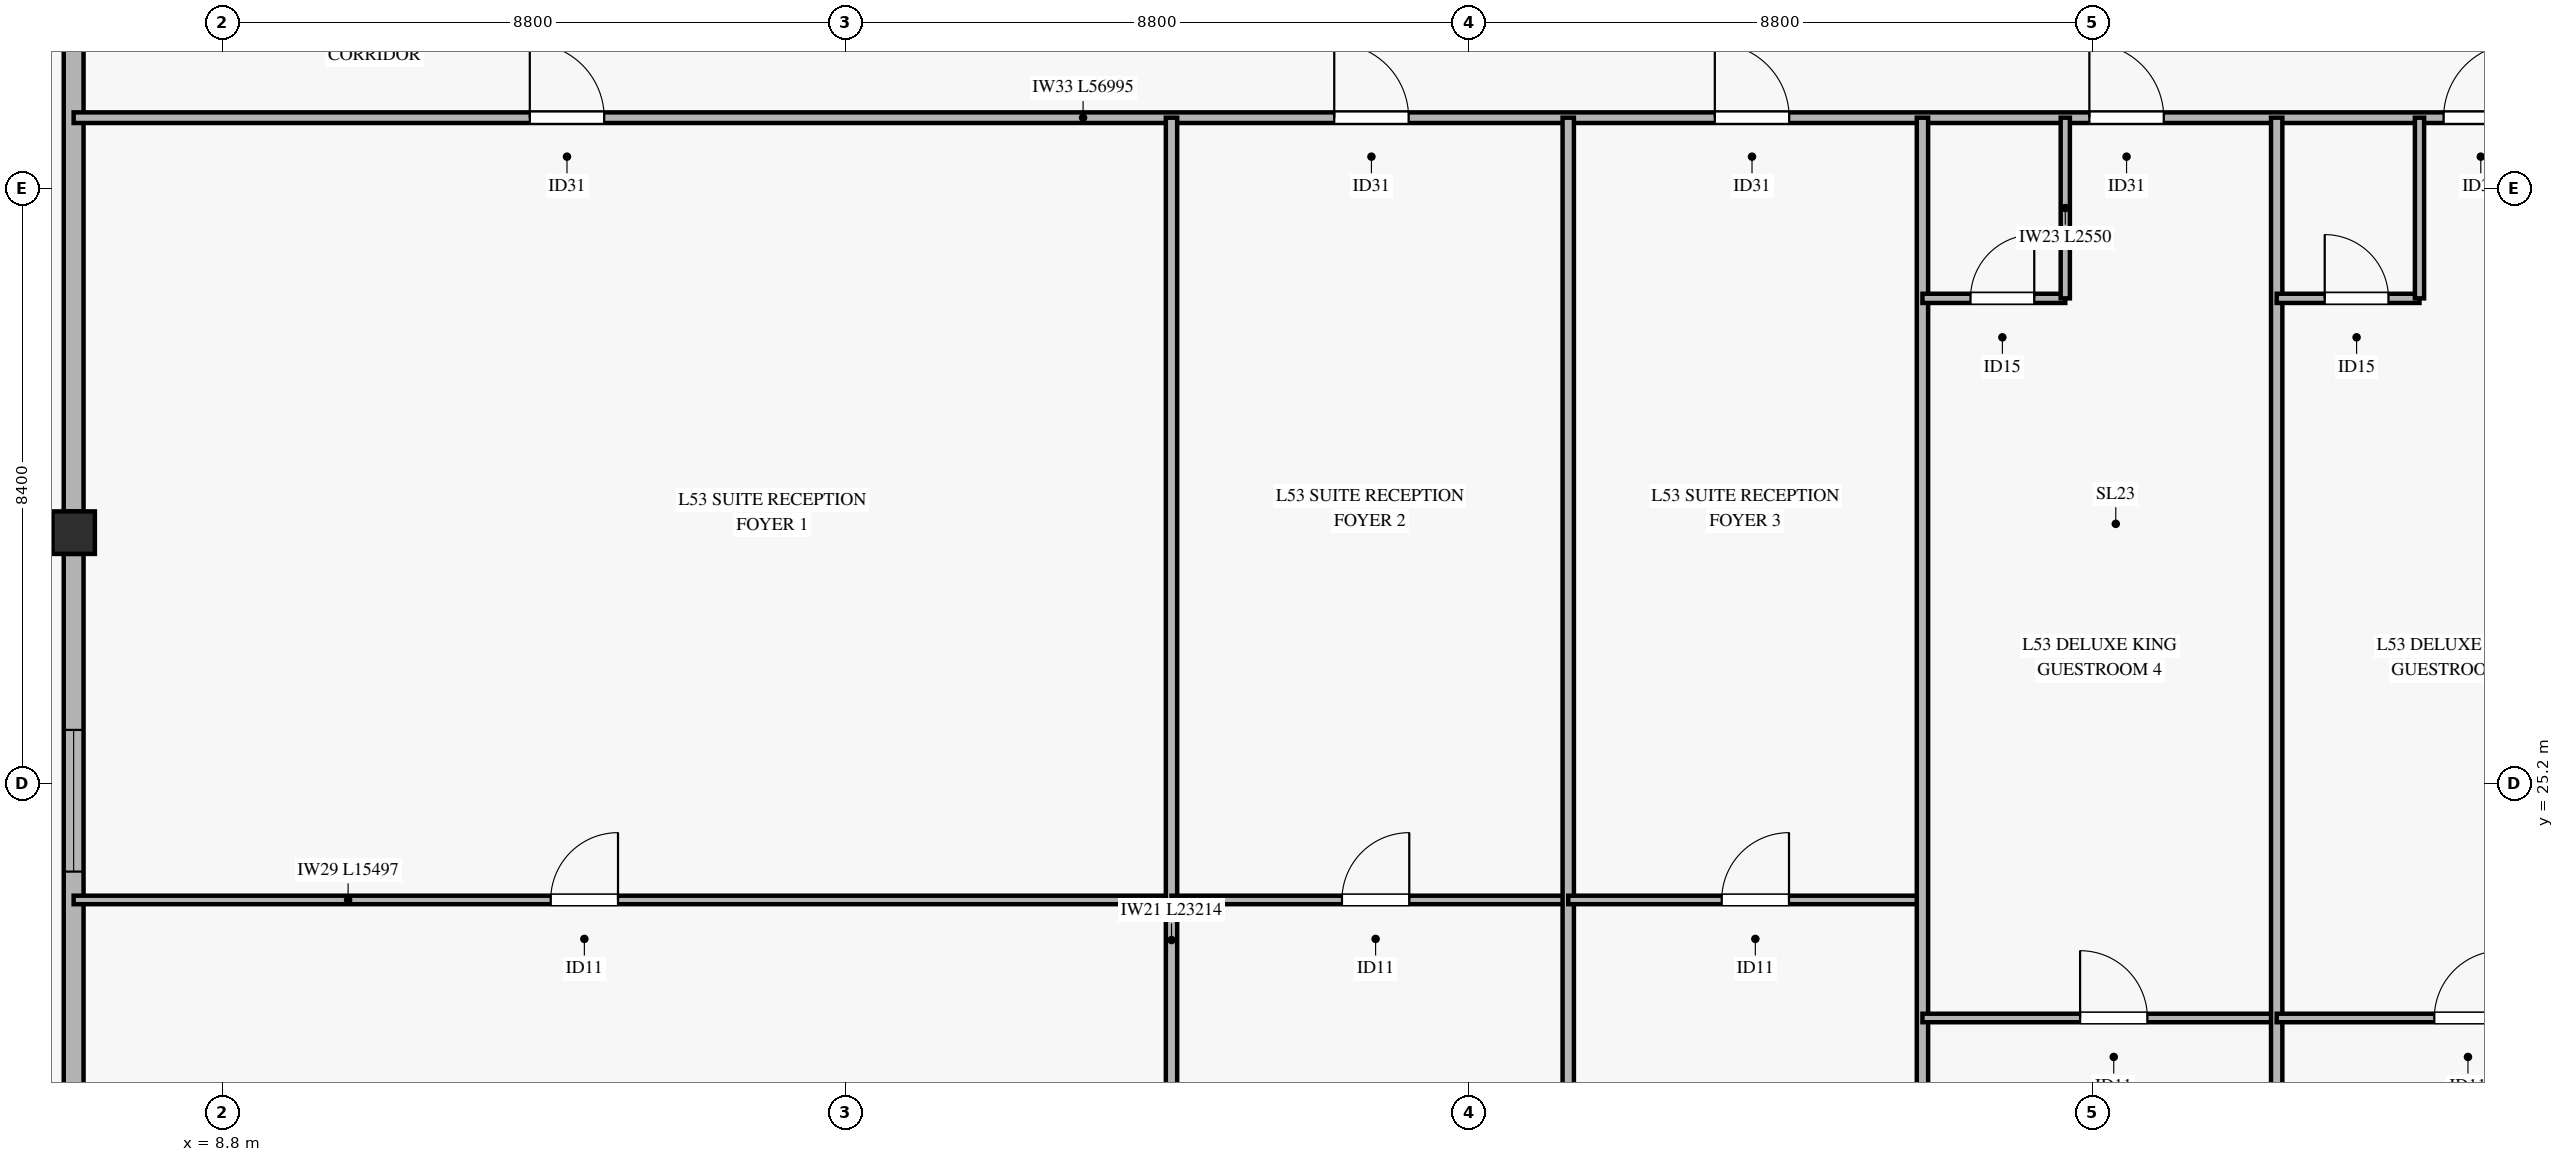
"""IFC4 building model, lengths in metres.
Left out: names, types, materials, properties, quantities, classifications, styles, units other than length and angle.
Written with IfcOpenShell. Run it as: python <this file> out.ifc"""

import sys

from ifc_helpers import new_model, si_unit, direction, frame, frame_2d, origin, origin_2d, place, context, subcontext, project, spatial, rectangle, hollow_rectangle, extrude, source, transform, mapped, element, fill, save


model = new_model("IFC4")
c1 = context("Model", 3, precision=1e-05, world=origin(), true_north=direction((0.0, 1.0)))
c2 = subcontext(c1, "Body", "Model", "MODEL_VIEW")
j1 = project(units=[si_unit("LENGTHUNIT", "METRE"), si_unit("PLANEANGLEUNIT", "RADIAN")], contexts=[c1])
p1 = place(None, origin())
s1 = spatial("IfcSite", under=j1, at=p1, CompositionType="ELEMENT")
p2 = place(p1, origin())
s2 = spatial("IfcBuilding", under=s1, at=p2, CompositionType="ELEMENT")
p3 = place(p2, frame((0.0, 0.0, 209.7)))
s3 = spatial("IfcBuildingStorey", under=s2, at=p3, CompositionType="ELEMENT", Elevation=209.7)
m1 = source(origin(), c2, "Body", "SweptSolid", [
    extrude(hollow_rectangle(XDim=0.6, YDim=0.6, WallThickness=0.028, at=origin_2d()), origin(), (0.0, 0.0, 1.0), 3.329),
])
p4 = place(p3, frame((6.703, 28.743, 0.0), z_axis=(0.124672330917, 0.139999693953, 0.982271294295), x_axis=(-0.746804669772, 0.665043446104, 0.0)))
e1 = element("IfcColumn", 1, at=p4, inside=s3, PredefinedType="COLUMN", context=c2, shape_type="MappedRepresentation", body=[
    mapped(m1, transform((0.0, 0.0, 0.0), x_axis=(1.0, 0.0, 0.0), y_axis=(0.0, 1.0, 0.0), z_axis=(0.0, 0.0, 1.0), scale=1.0)),
])
p5 = place(p3, frame((6.703, 14.186, 0.0), z_axis=(0.0, 0.0, 1.0), x_axis=(0.0, 1.0, 0.0)))
e2 = element("IfcWall", 2, at=p5, inside=s3, PredefinedType="SOLIDWALL", context=c2, shape_type="SweptSolid", body=[
    extrude(rectangle(XDim=14.257, YDim=0.28, at=frame_2d((7.128, 0.0))), origin(), (0.0, 0.0, 1.0), 2.75),
])
p6 = place(p5, frame((2.947, 0.0, 0.45)))
e3 = element("IfcOpeningElement", 3, at=p6, cuts=e2, PredefinedType="OPENING", context=c2, shape_type="SweptSolid", body=[
    extrude(rectangle(XDim=2.0, YDim=2.0, at=frame_2d((1.0, 1.0))), frame((0.0, 0.15, 0.0), z_axis=(0.0, -1.0, 0.0), x_axis=(1.0, 0.0, 0.0)), (0.0, 0.0, 1.0), 0.3),
])
p7 = place(p5, frame((9.773, 0.0, 0.45)))
e4 = element("IfcOpeningElement", 4, at=p7, cuts=e2, PredefinedType="OPENING", context=c2, shape_type="SweptSolid", body=[
    extrude(rectangle(XDim=2.0, YDim=2.0, at=frame_2d((1.0, 1.0))), frame((0.0, 0.15, 0.0), z_axis=(0.0, -1.0, 0.0), x_axis=(1.0, 0.0, 0.0)), (0.0, 0.0, 1.0), 0.3),
])
p8 = place(p3, frame((6.703, 29.043, 0.0), z_axis=(0.0, 0.0, 1.0), x_axis=(0.0, 1.0, 0.0)))
e5 = element("IfcWall", 5, at=p8, inside=s3, PredefinedType="SOLIDWALL", context=c2, shape_type="SweptSolid", body=[
    extrude(rectangle(XDim=14.257, YDim=0.28, at=frame_2d((7.128, 0.0))), origin(), (0.0, 0.0, 1.0), 2.75),
])
p9 = place(p8, frame((8.812, 0.0, 0.45)))
e6 = element("IfcOpeningElement", 6, at=p9, cuts=e5, PredefinedType="OPENING", context=c2, shape_type="SweptSolid", body=[
    extrude(rectangle(XDim=2.0, YDim=2.0, at=frame_2d((1.0, 1.0))), frame((0.0, 0.15, 0.0), z_axis=(0.0, -1.0, 0.0), x_axis=(1.0, 0.0, 0.0)), (0.0, 0.0, 1.0), 0.3),
])
p10 = place(p3, frame((6.703, 34.6, 0.0), z_axis=(0.0, 0.0, 1.0), x_axis=(1.0, 0.0, 0.0)))
e7 = element("IfcWall", 7, at=p10, inside=s3, PredefinedType="PARTITIONING", context=c2, shape_type="SweptSolid", body=[
    extrude(rectangle(XDim=56.995, YDim=0.15, at=frame_2d((28.498, 0.0))), origin(), (0.0, 0.0, 1.0), 2.455),
])
p11 = place(p10, frame((6.439, 0.0, 0.0)))
e8 = element("IfcOpeningElement", 8, at=p11, cuts=e7, PredefinedType="OPENING", context=c2, shape_type="SweptSolid", body=[
    extrude(rectangle(XDim=1.05, YDim=2.15, at=frame_2d((0.525, 1.075))), frame((0.0, 0.085, 0.0), z_axis=(0.0, -1.0, 0.0), x_axis=(1.0, 0.0, 0.0)), (0.0, 0.0, 1.0), 0.17),
])
p12 = place(p10, frame((17.794, 0.0, 0.0)))
e9 = element("IfcOpeningElement", 9, at=p12, cuts=e7, PredefinedType="OPENING", context=c2, shape_type="SweptSolid", body=[
    extrude(rectangle(XDim=1.05, YDim=2.15, at=frame_2d((0.525, 1.075))), frame((0.0, 0.085, 0.0), z_axis=(0.0, -1.0, 0.0), x_axis=(1.0, 0.0, 0.0)), (0.0, 0.0, 1.0), 0.17),
])
p13 = place(p10, frame((23.166, 0.0, 0.0)))
e10 = element("IfcOpeningElement", 10, at=p13, cuts=e7, PredefinedType="OPENING", context=c2, shape_type="SweptSolid", body=[
    extrude(rectangle(XDim=1.05, YDim=2.15, at=frame_2d((0.525, 1.075))), frame((0.0, 0.085, 0.0), z_axis=(0.0, -1.0, 0.0), x_axis=(1.0, 0.0, 0.0)), (0.0, 0.0, 1.0), 0.17),
])
p14 = place(p10, frame((28.453, 0.0, 0.0)))
e11 = element("IfcOpeningElement", 11, at=p14, cuts=e7, PredefinedType="OPENING", context=c2, shape_type="SweptSolid", body=[
    extrude(rectangle(XDim=1.05, YDim=2.15, at=frame_2d((0.525, 1.075))), frame((0.0, 0.085, 0.0), z_axis=(0.0, -1.0, 0.0), x_axis=(1.0, 0.0, 0.0)), (0.0, 0.0, 1.0), 0.17),
])
p15 = place(p10, frame((33.453, 0.0, 0.0)))
e12 = element("IfcOpeningElement", 12, at=p15, cuts=e7, PredefinedType="OPENING", context=c2, shape_type="SweptSolid", body=[
    extrude(rectangle(XDim=1.05, YDim=2.15, at=frame_2d((0.525, 1.075))), frame((0.0, 0.085, 0.0), z_axis=(0.0, -1.0, 0.0), x_axis=(1.0, 0.0, 0.0)), (0.0, 0.0, 1.0), 0.17),
])
p16 = place(p10, frame((43.973, 0.0, 0.0)))
e13 = element("IfcOpeningElement", 13, at=p16, cuts=e7, PredefinedType="OPENING", context=c2, shape_type="SweptSolid", body=[
    extrude(rectangle(XDim=1.05, YDim=2.15, at=frame_2d((0.525, 1.075))), frame((0.0, 0.085, 0.0), z_axis=(0.0, -1.0, 0.0), x_axis=(1.0, 0.0, 0.0)), (0.0, 0.0, 1.0), 0.17),
])
p17 = place(p3, frame((6.703, 23.559, 0.0), z_axis=(0.0, 0.0, 1.0), x_axis=(1.0, 0.0, 0.0)))
e14 = element("IfcWall", 14, at=p17, inside=s3, PredefinedType="PARTITIONING", context=c2, shape_type="SweptSolid", body=[
    extrude(rectangle(XDim=15.497, YDim=0.12, at=frame_2d((7.749, 0.0))), origin(), (0.0, 0.0, 1.0), 2.455),
])
p18 = place(p17, frame((6.734, 0.0, 0.0)))
e15 = element("IfcOpeningElement", 15, at=p18, cuts=e14, PredefinedType="OPENING", context=c2, shape_type="SweptSolid", body=[
    extrude(rectangle(XDim=0.95, YDim=2.1, at=frame_2d((0.475, 1.05))), frame((0.0, 0.07, 0.0), z_axis=(0.0, -1.0, 0.0), x_axis=(1.0, 0.0, 0.0)), (0.0, 0.0, 1.0), 0.14),
])
p19 = place(p3, frame((22.2, 11.386, 0.0), z_axis=(0.0, 0.0, 1.0), x_axis=(0.0, 1.0, 0.0)))
e16 = element("IfcWall", 16, at=p19, inside=s3, PredefinedType="PARTITIONING", context=c2, shape_type="SweptSolid", body=[
    extrude(rectangle(XDim=23.214, YDim=0.16, at=frame_2d((11.607, 0.0))), origin(), (0.0, 0.0, 1.0), 2.755),
])
p20 = place(p3, frame((22.2, 23.559, 0.0), z_axis=(0.0, 0.0, 1.0), x_axis=(1.0, 0.0, 0.0)))
e17 = element("IfcWall", 17, at=p20, inside=s3, PredefinedType="PARTITIONING", context=c2, shape_type="SweptSolid", body=[
    extrude(rectangle(XDim=5.6, YDim=0.12, at=frame_2d((2.8, 0.0))), origin(), (0.0, 0.0, 1.0), 3.27),
])
p21 = place(p20, frame((2.406, 0.0, 0.0)))
e18 = element("IfcOpeningElement", 18, at=p21, cuts=e17, PredefinedType="OPENING", context=c2, shape_type="SweptSolid", body=[
    extrude(rectangle(XDim=0.95, YDim=2.1, at=frame_2d((0.475, 1.05))), frame((0.0, 0.07, 0.0), z_axis=(0.0, -1.0, 0.0), x_axis=(1.0, 0.0, 0.0)), (0.0, 0.0, 1.0), 0.14),
])
p22 = place(p3, frame((27.8, 11.386, 0.0), z_axis=(0.0, 0.0, 1.0), x_axis=(0.0, 1.0, 0.0)))
e19 = element("IfcWall", 19, at=p22, inside=s3, PredefinedType="PARTITIONING", context=c2, shape_type="SweptSolid", body=[
    extrude(rectangle(XDim=23.214, YDim=0.16, at=frame_2d((11.607, 0.0))), origin(), (0.0, 0.0, 1.0), 2.755),
])
p23 = place(p3, frame((27.8, 23.559, 0.0), z_axis=(0.0, 0.0, 1.0), x_axis=(1.0, 0.0, 0.0)))
e20 = element("IfcWall", 20, at=p23, inside=s3, PredefinedType="PARTITIONING", context=c2, shape_type="SweptSolid", body=[
    extrude(rectangle(XDim=5.0, YDim=0.12, at=frame_2d((2.5, 0.0))), origin(), (0.0, 0.0, 1.0), 2.455),
])
p24 = place(p23, frame((2.166, 0.0, 0.0)))
e21 = element("IfcOpeningElement", 21, at=p24, cuts=e20, PredefinedType="OPENING", context=c2, shape_type="SweptSolid", body=[
    extrude(rectangle(XDim=0.95, YDim=2.1, at=frame_2d((0.475, 1.05))), frame((0.0, 0.07, 0.0), z_axis=(0.0, -1.0, 0.0), x_axis=(1.0, 0.0, 0.0)), (0.0, 0.0, 1.0), 0.14),
])
p25 = place(p3, frame((32.8, 11.386, 0.0), z_axis=(0.0, 0.0, 1.0), x_axis=(0.0, 1.0, 0.0)))
e22 = element("IfcWall", 22, at=p25, inside=s3, PredefinedType="PARTITIONING", context=c2, shape_type="SweptSolid", body=[
    extrude(rectangle(XDim=23.214, YDim=0.16, at=frame_2d((11.607, 0.0))), origin(), (0.0, 0.0, 1.0), 2.755),
])
p26 = place(p3, frame((32.8, 32.05, 0.0), z_axis=(0.0, 0.0, 1.0), x_axis=(1.0, 0.0, 0.0)))
e23 = element("IfcWall", 23, at=p26, inside=s3, PredefinedType="PARTITIONING", context=c2, shape_type="SweptSolid", body=[
    extrude(rectangle(XDim=2.016, YDim=0.13, at=frame_2d((1.008, 0.0))), origin(), (0.0, 0.0, 1.0), 3.27),
])
p27 = place(p26, frame((0.678, 0.0, 0.0)))
e24 = element("IfcOpeningElement", 24, at=p27, cuts=e23, PredefinedType="OPENING", context=c2, shape_type="SweptSolid", body=[
    extrude(rectangle(XDim=0.9, YDim=2.1, at=frame_2d((0.45, 1.05))), frame((0.0, 0.075, 0.0), z_axis=(0.0, -1.0, 0.0), x_axis=(1.0, 0.0, 0.0)), (0.0, 0.0, 1.0), 0.15),
])
p28 = place(p3, frame((34.816, 32.05, 0.0), z_axis=(0.0, 0.0, 1.0), x_axis=(0.0, 1.0, 0.0)))
e25 = element("IfcWall", 25, at=p28, inside=s3, PredefinedType="PARTITIONING", context=c2, shape_type="SweptSolid", body=[
    extrude(rectangle(XDim=2.55, YDim=0.13, at=frame_2d((1.275, 0.0))), origin(), (0.0, 0.0, 1.0), 2.855),
])
p29 = place(p3, frame((32.8, 21.893, 0.0), z_axis=(0.0, 0.0, 1.0), x_axis=(1.0, 0.0, 0.0)))
e26 = element("IfcWall", 26, at=p29, inside=s3, PredefinedType="PARTITIONING", context=c2, shape_type="SweptSolid", body=[
    extrude(rectangle(XDim=5.0, YDim=0.12, at=frame_2d((2.5, 0.0))), origin(), (0.0, 0.0, 1.0), 2.455),
])
p30 = place(p29, frame((2.225, 0.0, 0.0)))
e27 = element("IfcOpeningElement", 27, at=p30, cuts=e26, PredefinedType="OPENING", context=c2, shape_type="SweptSolid", body=[
    extrude(rectangle(XDim=0.95, YDim=2.1, at=frame_2d((0.475, 1.05))), frame((0.0, 0.07, 0.0), z_axis=(0.0, -1.0, 0.0), x_axis=(1.0, 0.0, 0.0)), (0.0, 0.0, 1.0), 0.14),
])
p31 = place(p3, frame((37.8, 11.386, 0.0), z_axis=(0.0, 0.0, 1.0), x_axis=(0.0, 1.0, 0.0)))
e28 = element("IfcWall", 28, at=p31, inside=s3, PredefinedType="PARTITIONING", context=c2, shape_type="SweptSolid", body=[
    extrude(rectangle(XDim=23.214, YDim=0.16, at=frame_2d((11.607, 0.0))), origin(), (0.0, 0.0, 1.0), 2.455),
])
p32 = place(p3, frame((37.8, 32.05, 0.0), z_axis=(0.0, 0.0, 1.0), x_axis=(1.0, 0.0, 0.0)))
e29 = element("IfcWall", 29, at=p32, inside=s3, PredefinedType="PARTITIONING", context=c2, shape_type="SweptSolid", body=[
    extrude(rectangle(XDim=2.016, YDim=0.13, at=frame_2d((1.008, 0.0))), origin(), (0.0, 0.0, 1.0), 3.27),
])
p33 = place(p32, frame((0.678, 0.0, 0.0)))
e30 = element("IfcOpeningElement", 30, at=p33, cuts=e29, PredefinedType="OPENING", context=c2, shape_type="SweptSolid", body=[
    extrude(rectangle(XDim=0.9, YDim=2.1, at=frame_2d((0.45, 1.05))), frame((0.0, 0.075, 0.0), z_axis=(0.0, -1.0, 0.0), x_axis=(1.0, 0.0, 0.0)), (0.0, 0.0, 1.0), 0.15),
])
p34 = place(p3, frame((39.816, 32.05, 0.0), z_axis=(0.0, 0.0, 1.0), x_axis=(0.0, 1.0, 0.0)))
e31 = element("IfcWall", 31, at=p34, inside=s3, PredefinedType="PARTITIONING", context=c2, shape_type="SweptSolid", body=[
    extrude(rectangle(XDim=2.55, YDim=0.13, at=frame_2d((1.275, 0.0))), origin(), (0.0, 0.0, 1.0), 2.855),
])
p35 = place(p3, frame((37.8, 21.893, 0.0), z_axis=(0.0, 0.0, 1.0), x_axis=(1.0, 0.0, 0.0)))
e32 = element("IfcWall", 32, at=p35, inside=s3, PredefinedType="PARTITIONING", context=c2, shape_type="SweptSolid", body=[
    extrude(rectangle(XDim=5.0, YDim=0.12, at=frame_2d((2.5, 0.0))), origin(), (0.0, 0.0, 1.0), 3.27),
])
p36 = place(p35, frame((2.225, 0.0, 0.0)))
e33 = element("IfcOpeningElement", 33, at=p36, cuts=e32, PredefinedType="OPENING", context=c2, shape_type="SweptSolid", body=[
    extrude(rectangle(XDim=0.95, YDim=2.1, at=frame_2d((0.475, 1.05))), frame((0.0, 0.07, 0.0), z_axis=(0.0, -1.0, 0.0), x_axis=(1.0, 0.0, 0.0)), (0.0, 0.0, 1.0), 0.14),
])
m2 = source(origin(), c2, "Body", "SweptSolid", [
    extrude(rectangle(XDim=2.0, YDim=2.0, at=frame_2d((1.0, 1.0))), frame((0.0, 0.03, 0.0), z_axis=(0.0, -1.0, 0.0), x_axis=(1.0, 0.0, 0.0)), (0.0, 0.0, 1.0), 0.06),
])
p37 = place(p7, origin())
e34 = element("IfcWindow", 34, at=p37, inside=s3, PartitioningType="SINGLE_PANEL", PredefinedType="WINDOW", context=c2, shape_type="MappedRepresentation", body=[
    mapped(m2, transform((0.0, 0.0, 0.0), x_axis=(1.0, 0.0, 0.0), y_axis=(0.0, 1.0, 0.0), z_axis=(0.0, 0.0, 1.0), scale=1.0)),
])
fill(e4, e34)
m3 = source(origin(), c2, "Body", "SweptSolid", [
    extrude(rectangle(XDim=1.05, YDim=2.15, at=frame_2d((0.525, 1.075))), frame((0.0, 0.025, 0.0), z_axis=(0.0, -1.0, 0.0), x_axis=(1.0, 0.0, 0.0)), (0.0, 0.0, 1.0), 0.05),
])
p38 = place(p11, origin())
e35 = element("IfcDoor", 35, at=p38, inside=s3, OperationType="SINGLE_SWING_LEFT", PredefinedType="DOOR", context=c2, shape_type="MappedRepresentation", body=[
    mapped(m3, transform((0.0, 0.0, 0.0), x_axis=(1.0, 0.0, 0.0), y_axis=(0.0, 1.0, 0.0), z_axis=(0.0, 0.0, 1.0), scale=1.0)),
])
fill(e8, e35)
m4 = source(origin(), c2, "Body", "SweptSolid", [
    extrude(rectangle(XDim=0.95, YDim=2.1, at=frame_2d((0.475, 1.05))), frame((0.0, 0.025, 0.0), z_axis=(0.0, -1.0, 0.0), x_axis=(1.0, 0.0, 0.0)), (0.0, 0.0, 1.0), 0.05),
])
p39 = place(p18, origin())
e36 = element("IfcDoor", 36, at=p39, inside=s3, OperationType="SINGLE_SWING_RIGHT", PredefinedType="DOOR", context=c2, shape_type="MappedRepresentation", body=[
    mapped(m4, transform((0.0, 0.0, 0.0), x_axis=(1.0, 0.0, 0.0), y_axis=(0.0, 1.0, 0.0), z_axis=(0.0, 0.0, 1.0), scale=1.0)),
])
fill(e15, e36)
p40 = place(p12, origin())
e37 = element("IfcDoor", 37, at=p40, inside=s3, OperationType="SINGLE_SWING_LEFT", PredefinedType="DOOR", context=c2, shape_type="MappedRepresentation", body=[
    mapped(m3, transform((0.0, 0.0, 0.0), x_axis=(1.0, 0.0, 0.0), y_axis=(0.0, 1.0, 0.0), z_axis=(0.0, 0.0, 1.0), scale=1.0)),
])
fill(e9, e37)
p41 = place(p21, origin())
e38 = element("IfcDoor", 38, at=p41, inside=s3, OperationType="SINGLE_SWING_RIGHT", PredefinedType="DOOR", context=c2, shape_type="MappedRepresentation", body=[
    mapped(m4, transform((0.0, 0.0, 0.0), x_axis=(1.0, 0.0, 0.0), y_axis=(0.0, 1.0, 0.0), z_axis=(0.0, 0.0, 1.0), scale=1.0)),
])
fill(e18, e38)
p42 = place(p13, origin())
e39 = element("IfcDoor", 39, at=p42, inside=s3, OperationType="SINGLE_SWING_LEFT", PredefinedType="DOOR", context=c2, shape_type="MappedRepresentation", body=[
    mapped(m3, transform((0.0, 0.0, 0.0), x_axis=(1.0, 0.0, 0.0), y_axis=(0.0, 1.0, 0.0), z_axis=(0.0, 0.0, 1.0), scale=1.0)),
])
fill(e10, e39)
p43 = place(p24, origin())
e40 = element("IfcDoor", 40, at=p43, inside=s3, OperationType="SINGLE_SWING_RIGHT", PredefinedType="DOOR", context=c2, shape_type="MappedRepresentation", body=[
    mapped(m4, transform((0.0, 0.0, 0.0), x_axis=(1.0, 0.0, 0.0), y_axis=(0.0, 1.0, 0.0), z_axis=(0.0, 0.0, 1.0), scale=1.0)),
])
fill(e21, e40)
p44 = place(p14, origin())
e41 = element("IfcDoor", 41, at=p44, inside=s3, OperationType="SINGLE_SWING_LEFT", PredefinedType="DOOR", context=c2, shape_type="MappedRepresentation", body=[
    mapped(m3, transform((0.0, 0.0, 0.0), x_axis=(1.0, 0.0, 0.0), y_axis=(0.0, 1.0, 0.0), z_axis=(0.0, 0.0, 1.0), scale=1.0)),
])
fill(e11, e41)
m5 = source(origin(), c2, "Body", "SweptSolid", [
    extrude(rectangle(XDim=0.9, YDim=2.1, at=frame_2d((0.45, 1.05))), frame((0.0, 0.025, 0.0), z_axis=(0.0, -1.0, 0.0), x_axis=(1.0, 0.0, 0.0)), (0.0, 0.0, 1.0), 0.05),
])
p45 = place(p27, origin())
e42 = element("IfcDoor", 42, at=p45, inside=s3, OperationType="SINGLE_SWING_RIGHT", PredefinedType="DOOR", context=c2, shape_type="MappedRepresentation", body=[
    mapped(m5, transform((0.0, 0.0, 0.0), x_axis=(1.0, 0.0, 0.0), y_axis=(0.0, 1.0, 0.0), z_axis=(0.0, 0.0, 1.0), scale=1.0)),
])
fill(e24, e42)
p46 = place(p30, origin())
e43 = element("IfcDoor", 43, at=p46, inside=s3, OperationType="SINGLE_SWING_LEFT", PredefinedType="DOOR", context=c2, shape_type="MappedRepresentation", body=[
    mapped(m4, transform((0.0, 0.0, 0.0), x_axis=(1.0, 0.0, 0.0), y_axis=(0.0, 1.0, 0.0), z_axis=(0.0, 0.0, 1.0), scale=1.0)),
])
fill(e27, e43)
p47 = place(p15, origin())
e44 = element("IfcDoor", 44, at=p47, inside=s3, OperationType="SINGLE_SWING_RIGHT", PredefinedType="DOOR", context=c2, shape_type="MappedRepresentation", body=[
    mapped(m3, transform((0.0, 0.0, 0.0), x_axis=(1.0, 0.0, 0.0), y_axis=(0.0, 1.0, 0.0), z_axis=(0.0, 0.0, 1.0), scale=1.0)),
])
fill(e12, e44)
p48 = place(p33, origin())
e45 = element("IfcDoor", 45, at=p48, inside=s3, OperationType="SINGLE_SWING_LEFT", PredefinedType="DOOR", context=c2, shape_type="MappedRepresentation", body=[
    mapped(m5, transform((0.0, 0.0, 0.0), x_axis=(1.0, 0.0, 0.0), y_axis=(0.0, 1.0, 0.0), z_axis=(0.0, 0.0, 1.0), scale=1.0)),
])
fill(e30, e45)
p49 = place(p36, origin())
e46 = element("IfcDoor", 46, at=p49, inside=s3, OperationType="SINGLE_SWING_RIGHT", PredefinedType="DOOR", context=c2, shape_type="MappedRepresentation", body=[
    mapped(m4, transform((0.0, 0.0, 0.0), x_axis=(1.0, 0.0, 0.0), y_axis=(0.0, 1.0, 0.0), z_axis=(0.0, 0.0, 1.0), scale=1.0)),
])
fill(e33, e46)
save(model, sys.argv[1])
